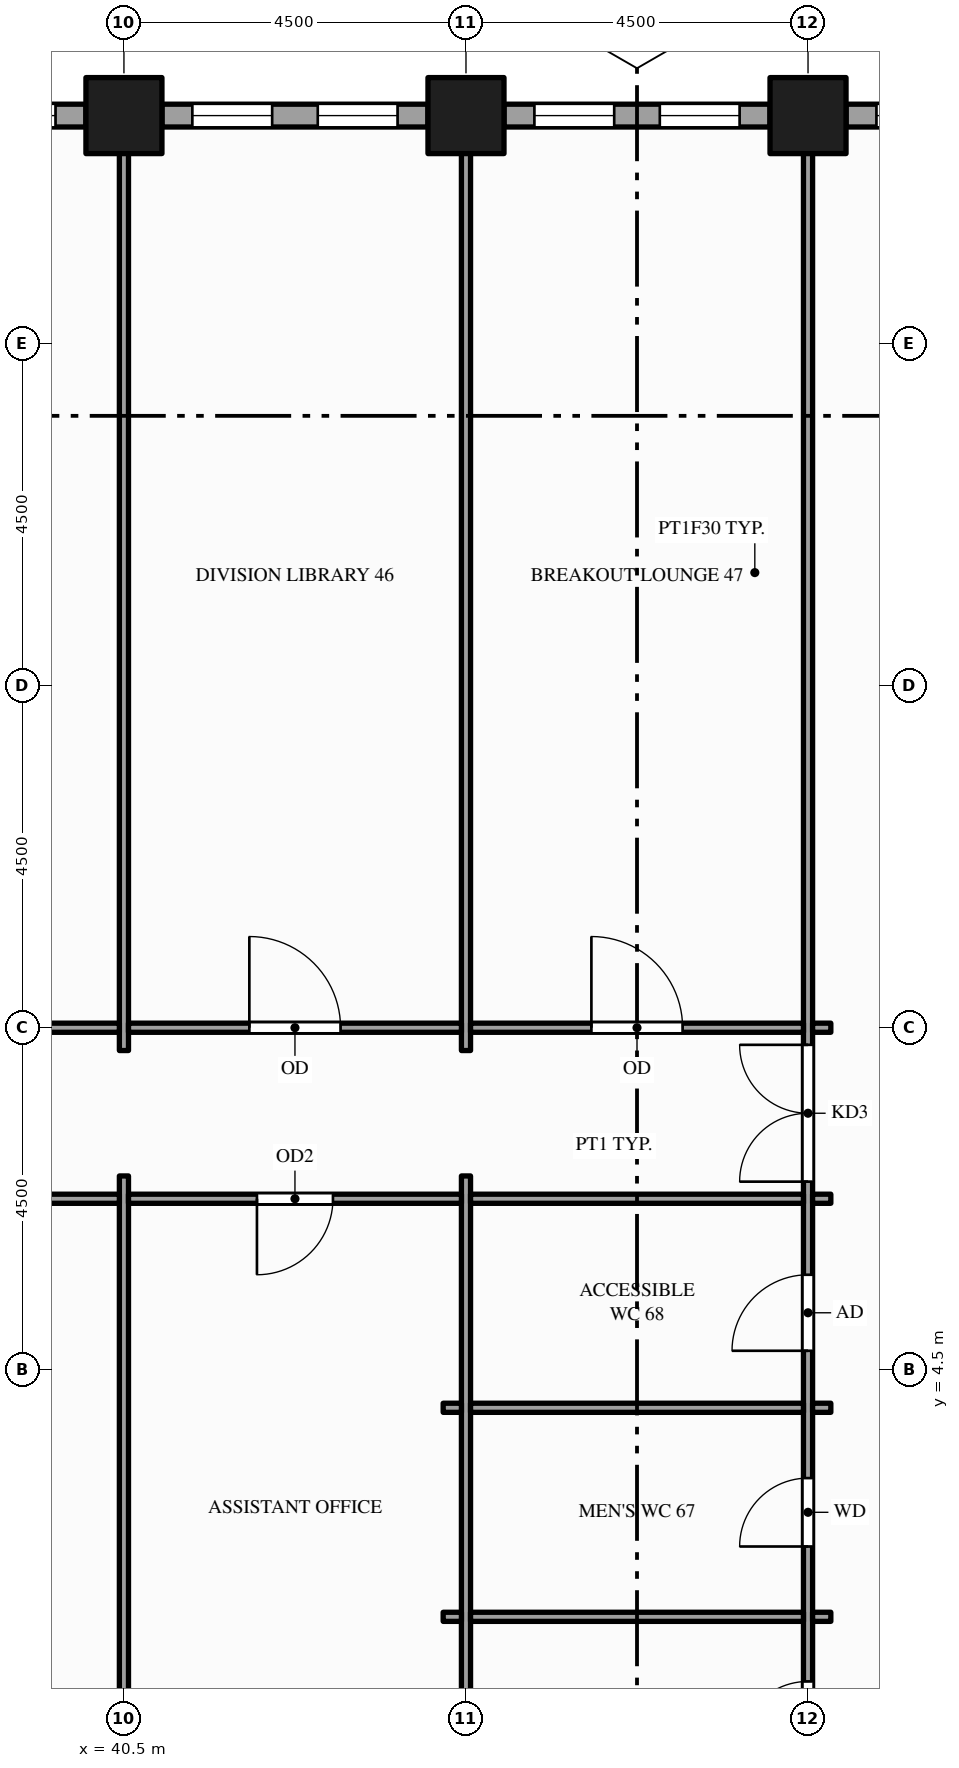
"""IFC4 building model, lengths in metres.
Left out: names, types, materials, properties, quantities, classifications, styles, units other than length and angle.
Written with IfcOpenShell. Run it as: python <this file> out.ifc"""

import sys

from ifc_helpers import new_model, si_unit, direction, frame, frame_2d, origin, origin_2d, place, context, subcontext, project, spatial, rectangle, hollow_rectangle, extrude, element, fill, save


model = new_model("IFC4")
c1 = context("Model", 3, precision=1e-05, world=origin(), true_north=direction((0.0, 1.0)))
c2 = subcontext(c1, "Body", "Model", "MODEL_VIEW")
j1 = project(units=[si_unit("LENGTHUNIT", "METRE"), si_unit("PLANEANGLEUNIT", "RADIAN")], contexts=[c1])
p1 = place(None, origin())
s1 = spatial("IfcSite", under=j1, at=p1, CompositionType="ELEMENT")
p2 = place(p1, origin())
s2 = spatial("IfcBuilding", under=s1, at=p2, CompositionType="ELEMENT")
p3 = place(p2, frame((0.0, 0.0, 103.0)))
s3 = spatial("IfcBuildingStorey", under=s2, at=p3, CompositionType="ELEMENT", Elevation=103.0)
for number, where, z_axis, x_axis in (
    (1, (40.5, 21.0, -0.15), (0.0, 0.0, 1.0), (1.0, 0.0, 0.0)),
    (2, (45.0, 21.0, -0.15), (0.0, 0.0, 1.0), (1.0, 0.0, 0.0)),
    (3, (49.5, 21.0, -0.15), (0.0, 0.0, 1.0), (1.0, 0.0, 0.0)),
):
    element("IfcColumn", number, at=place(p3, frame(where, z_axis=z_axis, x_axis=x_axis)), inside=s3, PredefinedType="COLUMN", context=c2, shape_type="SweptSolid", body=[
        extrude(hollow_rectangle(XDim=1.0, YDim=1.0, WallThickness=0.05, at=origin_2d()), origin(), (0.0, 0.0, 1.0), 4.0),
    ])
p4 = place(p3, frame((54.0, 21.0, 0.0), z_axis=(0.0, 0.0, 1.0), x_axis=(-1.0, 0.0, 0.0)))
e4 = element("IfcWall", 4, at=p4, inside=s3, PredefinedType="STANDARD", context=c2, shape_type="SweptSolid", body=[
    extrude(rectangle(XDim=4.0, YDim=0.3, at=frame_2d((2.0, 0.0))), origin(), (0.0, 0.0, 1.0), 3.154),
])
p5 = place(p4, frame((0.4, 0.0, 0.9)))
e5 = element("IfcOpeningElement", 5, at=p5, cuts=e4, PredefinedType="OPENING", context=c2, shape_type="SweptSolid", body=[
    extrude(rectangle(XDim=1.55, YDim=2.0, at=frame_2d((0.775, 1.0))), frame((0.0, 0.16, 0.0), z_axis=(0.0, -1.0, 0.0), x_axis=(1.0, 0.0, 0.0)), (0.0, 0.0, 1.0), 0.32),
])
p6 = place(p4, frame((2.55, 0.0, 0.9)))
e6 = element("IfcOpeningElement", 6, at=p6, cuts=e4, PredefinedType="OPENING", context=c2, shape_type="SweptSolid", body=[
    extrude(rectangle(XDim=1.05, YDim=2.0, at=frame_2d((0.525, 1.0))), frame((0.0, 0.16, 0.0), z_axis=(0.0, -1.0, 0.0), x_axis=(1.0, 0.0, 0.0)), (0.0, 0.0, 1.0), 0.32),
])
p7 = place(p3, frame((49.0, 21.0, 0.0), z_axis=(0.0, 0.0, 1.0), x_axis=(-1.0, 0.0, 0.0)))
e7 = element("IfcWall", 7, at=p7, inside=s3, PredefinedType="STANDARD", context=c2, shape_type="SweptSolid", body=[
    extrude(rectangle(XDim=3.5, YDim=0.3, at=frame_2d((1.75, 0.0))), origin(), (0.0, 0.0, 1.0), 3.154),
])
p8 = place(p7, frame((0.4, 0.0, 0.9)))
e8 = element("IfcOpeningElement", 8, at=p8, cuts=e7, PredefinedType="OPENING", context=c2, shape_type="SweptSolid", body=[
    extrude(rectangle(XDim=1.05, YDim=2.0, at=frame_2d((0.525, 1.0))), frame((0.0, 0.16, 0.0), z_axis=(0.0, -1.0, 0.0), x_axis=(1.0, 0.0, 0.0)), (0.0, 0.0, 1.0), 0.32),
])
p9 = place(p7, frame((2.05, 0.0, 0.9)))
e9 = element("IfcOpeningElement", 9, at=p9, cuts=e7, PredefinedType="OPENING", context=c2, shape_type="SweptSolid", body=[
    extrude(rectangle(XDim=1.05, YDim=2.0, at=frame_2d((0.525, 1.0))), frame((0.0, 0.16, 0.0), z_axis=(0.0, -1.0, 0.0), x_axis=(1.0, 0.0, 0.0)), (0.0, 0.0, 1.0), 0.32),
])
p10 = place(p3, frame((44.5, 21.0, 0.0), z_axis=(0.0, 0.0, 1.0), x_axis=(-1.0, 0.0, 0.0)))
e10 = element("IfcWall", 10, at=p10, inside=s3, PredefinedType="STANDARD", context=c2, shape_type="SweptSolid", body=[
    extrude(rectangle(XDim=3.5, YDim=0.3, at=frame_2d((1.75, 0.0))), origin(), (0.0, 0.0, 1.0), 3.154),
])
p11 = place(p10, frame((0.4, 0.0, 0.9)))
e11 = element("IfcOpeningElement", 11, at=p11, cuts=e10, PredefinedType="OPENING", context=c2, shape_type="SweptSolid", body=[
    extrude(rectangle(XDim=1.05, YDim=2.0, at=frame_2d((0.525, 1.0))), frame((0.0, 0.16, 0.0), z_axis=(0.0, -1.0, 0.0), x_axis=(1.0, 0.0, 0.0)), (0.0, 0.0, 1.0), 0.32),
])
p12 = place(p10, frame((2.05, 0.0, 0.9)))
e12 = element("IfcOpeningElement", 12, at=p12, cuts=e10, PredefinedType="OPENING", context=c2, shape_type="SweptSolid", body=[
    extrude(rectangle(XDim=1.05, YDim=2.0, at=frame_2d((0.525, 1.0))), frame((0.0, 0.16, 0.0), z_axis=(0.0, -1.0, 0.0), x_axis=(1.0, 0.0, 0.0)), (0.0, 0.0, 1.0), 0.32),
])
p13 = place(p3, frame((40.0, 21.0, 0.0), z_axis=(0.0, 0.0, 1.0), x_axis=(-1.0, 0.0, 0.0)))
e13 = element("IfcWall", 13, at=p13, inside=s3, PredefinedType="STANDARD", context=c2, shape_type="SweptSolid", body=[
    extrude(rectangle(XDim=3.5, YDim=0.3, at=frame_2d((1.75, 0.0))), origin(), (0.0, 0.0, 1.0), 3.154),
])
p14 = place(p13, frame((0.4, 0.0, 0.9)))
e14 = element("IfcOpeningElement", 14, at=p14, cuts=e13, PredefinedType="OPENING", context=c2, shape_type="SweptSolid", body=[
    extrude(rectangle(XDim=1.05, YDim=2.0, at=frame_2d((0.525, 1.0))), frame((0.0, 0.16, 0.0), z_axis=(0.0, -1.0, 0.0), x_axis=(1.0, 0.0, 0.0)), (0.0, 0.0, 1.0), 0.32),
])
p15 = place(p13, frame((2.05, 0.0, 0.9)))
e15 = element("IfcOpeningElement", 15, at=p15, cuts=e13, PredefinedType="OPENING", context=c2, shape_type="SweptSolid", body=[
    extrude(rectangle(XDim=1.05, YDim=2.0, at=frame_2d((0.525, 1.0))), frame((0.0, 0.16, 0.0), z_axis=(0.0, -1.0, 0.0), x_axis=(1.0, 0.0, 0.0)), (0.0, 0.0, 1.0), 0.32),
])
p16 = place(p3, frame((40.5, -1.35, 0.0), z_axis=(0.0, 0.0, 1.0), x_axis=(0.0, 1.0, 0.0)))
e16 = element("IfcWall", 16, at=p16, inside=s3, PredefinedType="PARTITIONING", context=c2, shape_type="SweptSolid", body=[
    extrude(rectangle(XDim=8.4, YDim=0.12, at=frame_2d((4.2, 0.0))), origin(), (0.0, 0.0, 1.0), 2.938),
])
p17 = place(p3, frame((40.5, 8.7, 0.0), z_axis=(0.0, 0.0, 1.0), x_axis=(0.0, 1.0, 0.0)))
e17 = element("IfcWall", 17, at=p17, inside=s3, PredefinedType="PARTITIONING", context=c2, shape_type="SweptSolid", body=[
    extrude(rectangle(XDim=12.15, YDim=0.12, at=frame_2d((6.075, 0.0))), origin(), (0.0, 0.0, 1.0), 2.938),
])
p18 = place(p3, frame((45.0, -1.35, 0.0), z_axis=(0.0, 0.0, 1.0), x_axis=(0.0, 1.0, 0.0)))
e18 = element("IfcWall", 18, at=p18, inside=s3, PredefinedType="PARTITIONING", context=c2, shape_type="SweptSolid", body=[
    extrude(rectangle(XDim=8.4, YDim=0.12, at=frame_2d((4.2, 0.0))), origin(), (0.0, 0.0, 1.0), 2.938),
])
p19 = place(p3, frame((45.0, 8.7, 0.0), z_axis=(0.0, 0.0, 1.0), x_axis=(0.0, 1.0, 0.0)))
e19 = element("IfcWall", 19, at=p19, inside=s3, PredefinedType="PARTITIONING", context=c2, shape_type="SweptSolid", body=[
    extrude(rectangle(XDim=12.15, YDim=0.12, at=frame_2d((6.075, 0.0))), origin(), (0.0, 0.0, 1.0), 2.938),
])
p20 = place(p3, frame((49.5, -1.35, 0.0), z_axis=(0.0, 0.0, 1.0), x_axis=(0.0, 1.0, 0.0)))
e20 = element("IfcWall", 20, at=p20, inside=s3, PredefinedType="PARTITIONING", context=c2, shape_type="SweptSolid", body=[
    extrude(rectangle(XDim=22.2, YDim=0.12, at=frame_2d((11.1, 0.0))), origin(), (0.0, 0.0, 1.0), 2.938),
])
p21 = place(p20, frame((8.325, 0.0, 0.0)))
e21 = element("IfcOpeningElement", 21, at=p21, cuts=e20, PredefinedType="OPENING", context=c2, shape_type="SweptSolid", body=[
    extrude(rectangle(XDim=1.8, YDim=2.1, at=frame_2d((0.9, 1.05))), frame((0.0, 0.07, 0.0), z_axis=(0.0, -1.0, 0.0), x_axis=(1.0, 0.0, 0.0)), (0.0, 0.0, 1.0), 0.14),
])
p22 = place(p20, frame((0.85, 0.0, 0.0)))
e22 = element("IfcOpeningElement", 22, at=p22, cuts=e20, PredefinedType="OPENING", context=c2, shape_type="SweptSolid", body=[
    extrude(rectangle(XDim=0.9, YDim=2.1, at=frame_2d((0.45, 1.05))), frame((0.0, 0.07, 0.0), z_axis=(0.0, -1.0, 0.0), x_axis=(1.0, 0.0, 0.0)), (0.0, 0.0, 1.0), 0.14),
])
p23 = place(p20, frame((3.525, 0.0, 0.0)))
e23 = element("IfcOpeningElement", 23, at=p23, cuts=e20, PredefinedType="OPENING", context=c2, shape_type="SweptSolid", body=[
    extrude(rectangle(XDim=0.9, YDim=2.1, at=frame_2d((0.45, 1.05))), frame((0.0, 0.07, 0.0), z_axis=(0.0, -1.0, 0.0), x_axis=(1.0, 0.0, 0.0)), (0.0, 0.0, 1.0), 0.14),
])
p24 = place(p20, frame((6.1, 0.0, 0.0)))
e24 = element("IfcOpeningElement", 24, at=p24, cuts=e20, PredefinedType="OPENING", context=c2, shape_type="SweptSolid", body=[
    extrude(rectangle(XDim=1.0, YDim=2.1, at=frame_2d((0.5, 1.05))), frame((0.0, 0.07, 0.0), z_axis=(0.0, -1.0, 0.0), x_axis=(1.0, 0.0, 0.0)), (0.0, 0.0, 1.0), 0.14),
])
p25 = place(p3, frame((44.7, 1.25, 0.0), z_axis=(0.0, 0.0, 1.0), x_axis=(1.0, 0.0, 0.0)))
e25 = element("IfcWall", 25, at=p25, inside=s3, PredefinedType="PARTITIONING", context=c2, shape_type="SweptSolid", body=[
    extrude(rectangle(XDim=0.24, YDim=0.12, at=frame_2d((0.12, 0.0))), origin(), (0.0, 0.0, 1.0), 2.938),
])
p26 = place(p3, frame((45.06, 1.25, 0.0), z_axis=(0.0, 0.0, 1.0), x_axis=(1.0, 0.0, 0.0)))
e26 = element("IfcWall", 26, at=p26, inside=s3, PredefinedType="PARTITIONING", context=c2, shape_type="SweptSolid", body=[
    extrude(rectangle(XDim=4.38, YDim=0.12, at=frame_2d((2.19, 0.0))), origin(), (0.0, 0.0, 1.0), 2.938),
])
for number, where, z_axis, x_axis in (
    (27, (49.56, 1.25, 0.0), (0.0, 0.0, 1.0), (1.0, 0.0, 0.0)),
    (28, (44.7, 4.0, 0.0), (0.0, 0.0, 1.0), (1.0, 0.0, 0.0)),
):
    element("IfcWall", number, at=place(p3, frame(where, z_axis=z_axis, x_axis=x_axis)), inside=s3, PredefinedType="PARTITIONING", context=c2, shape_type="SweptSolid", body=[
        extrude(rectangle(XDim=0.24, YDim=0.12, at=frame_2d((0.12, 0.0))), origin(), (0.0, 0.0, 1.0), 2.938),
    ])
p27 = place(p3, frame((45.06, 4.0, 0.0), z_axis=(0.0, 0.0, 1.0), x_axis=(1.0, 0.0, 0.0)))
e29 = element("IfcWall", 29, at=p27, inside=s3, PredefinedType="PARTITIONING", context=c2, shape_type="SweptSolid", body=[
    extrude(rectangle(XDim=4.38, YDim=0.12, at=frame_2d((2.19, 0.0))), origin(), (0.0, 0.0, 1.0), 2.938),
])
p28 = place(p3, frame((49.56, 4.0, 0.0), z_axis=(0.0, 0.0, 1.0), x_axis=(1.0, 0.0, 0.0)))
e30 = element("IfcWall", 30, at=p28, inside=s3, PredefinedType="PARTITIONING", context=c2, shape_type="SweptSolid", body=[
    extrude(rectangle(XDim=0.24, YDim=0.12, at=frame_2d((0.12, 0.0))), origin(), (0.0, 0.0, 1.0), 2.938),
])
p29 = place(p3, frame((36.06, 6.75, 0.0), z_axis=(0.0, 0.0, 1.0), x_axis=(1.0, 0.0, 0.0)))
e31 = element("IfcWall", 31, at=p29, inside=s3, PredefinedType="PARTITIONING", context=c2, shape_type="SweptSolid", body=[
    extrude(rectangle(XDim=4.38, YDim=0.12, at=frame_2d((2.19, 0.0))), origin(), (0.0, 0.0, 1.0), 2.938),
])
p30 = place(p29, frame((1.59, 0.0, 0.0)))
e32 = element("IfcOpeningElement", 32, at=p30, cuts=e31, PredefinedType="OPENING", context=c2, shape_type="SweptSolid", body=[
    extrude(rectangle(XDim=1.2, YDim=2.1, at=frame_2d((0.6, 1.05))), frame((0.0, 0.07, 0.0), z_axis=(0.0, -1.0, 0.0), x_axis=(1.0, 0.0, 0.0)), (0.0, 0.0, 1.0), 0.14),
])
p31 = place(p3, frame((40.56, 6.75, 0.0), z_axis=(0.0, 0.0, 1.0), x_axis=(1.0, 0.0, 0.0)))
e33 = element("IfcWall", 33, at=p31, inside=s3, PredefinedType="PARTITIONING", context=c2, shape_type="SweptSolid", body=[
    extrude(rectangle(XDim=4.38, YDim=0.12, at=frame_2d((2.19, 0.0))), origin(), (0.0, 0.0, 1.0), 2.938),
])
p32 = place(p31, frame((1.69, 0.0, 0.0)))
e34 = element("IfcOpeningElement", 34, at=p32, cuts=e33, PredefinedType="OPENING", context=c2, shape_type="SweptSolid", body=[
    extrude(rectangle(XDim=1.0, YDim=2.1, at=frame_2d((0.5, 1.05))), frame((0.0, 0.07, 0.0), z_axis=(0.0, -1.0, 0.0), x_axis=(1.0, 0.0, 0.0)), (0.0, 0.0, 1.0), 0.14),
])
p33 = place(p3, frame((45.06, 6.75, 0.0), z_axis=(0.0, 0.0, 1.0), x_axis=(1.0, 0.0, 0.0)))
e35 = element("IfcWall", 35, at=p33, inside=s3, PredefinedType="PARTITIONING", context=c2, shape_type="SweptSolid", body=[
    extrude(rectangle(XDim=4.38, YDim=0.12, at=frame_2d((2.19, 0.0))), origin(), (0.0, 0.0, 1.0), 2.938),
])
p34 = place(p3, frame((49.56, 6.75, 0.0), z_axis=(0.0, 0.0, 1.0), x_axis=(1.0, 0.0, 0.0)))
e36 = element("IfcWall", 36, at=p34, inside=s3, PredefinedType="PARTITIONING", context=c2, shape_type="SweptSolid", body=[
    extrude(rectangle(XDim=0.24, YDim=0.12, at=frame_2d((0.12, 0.0))), origin(), (0.0, 0.0, 1.0), 2.938),
])
p35 = place(p3, frame((31.56, 9.0, 0.0), z_axis=(0.0, 0.0, 1.0), x_axis=(1.0, 0.0, 0.0)))
e37 = element("IfcWall", 37, at=p35, inside=s3, PredefinedType="PARTITIONING", context=c2, shape_type="SweptSolid", body=[
    extrude(rectangle(XDim=8.88, YDim=0.12, at=frame_2d((4.44, 0.0))), origin(), (0.0, 0.0, 1.0), 2.938),
])
p36 = place(p35, frame((3.54, 0.0, 0.0)))
e38 = element("IfcOpeningElement", 38, at=p36, cuts=e37, PredefinedType="OPENING", context=c2, shape_type="SweptSolid", body=[
    extrude(rectangle(XDim=1.8, YDim=2.1, at=frame_2d((0.9, 1.05))), frame((0.0, 0.07, 0.0), z_axis=(0.0, -1.0, 0.0), x_axis=(1.0, 0.0, 0.0)), (0.0, 0.0, 1.0), 0.14),
])
p37 = place(p3, frame((40.56, 9.0, 0.0), z_axis=(0.0, 0.0, 1.0), x_axis=(1.0, 0.0, 0.0)))
e39 = element("IfcWall", 39, at=p37, inside=s3, PredefinedType="PARTITIONING", context=c2, shape_type="SweptSolid", body=[
    extrude(rectangle(XDim=4.38, YDim=0.12, at=frame_2d((2.19, 0.0))), origin(), (0.0, 0.0, 1.0), 2.938),
])
p38 = place(p37, frame((1.59, 0.0, 0.0)))
e40 = element("IfcOpeningElement", 40, at=p38, cuts=e39, PredefinedType="OPENING", context=c2, shape_type="SweptSolid", body=[
    extrude(rectangle(XDim=1.2, YDim=2.1, at=frame_2d((0.6, 1.05))), frame((0.0, 0.07, 0.0), z_axis=(0.0, -1.0, 0.0), x_axis=(1.0, 0.0, 0.0)), (0.0, 0.0, 1.0), 0.14),
])
p39 = place(p3, frame((45.06, 9.0, 0.0), z_axis=(0.0, 0.0, 1.0), x_axis=(1.0, 0.0, 0.0)))
e41 = element("IfcWall", 41, at=p39, inside=s3, PredefinedType="PARTITIONING", context=c2, shape_type="SweptSolid", body=[
    extrude(rectangle(XDim=4.38, YDim=0.12, at=frame_2d((2.19, 0.0))), origin(), (0.0, 0.0, 1.0), 2.938),
])
p40 = place(p39, frame((1.59, 0.0, 0.0)))
e42 = element("IfcOpeningElement", 42, at=p40, cuts=e41, PredefinedType="OPENING", context=c2, shape_type="SweptSolid", body=[
    extrude(rectangle(XDim=1.2, YDim=2.1, at=frame_2d((0.6, 1.05))), frame((0.0, 0.07, 0.0), z_axis=(0.0, -1.0, 0.0), x_axis=(1.0, 0.0, 0.0)), (0.0, 0.0, 1.0), 0.14),
])
p41 = place(p3, frame((49.56, 9.0, 0.0), z_axis=(0.0, 0.0, 1.0), x_axis=(1.0, 0.0, 0.0)))
e43 = element("IfcWall", 43, at=p41, inside=s3, PredefinedType="PARTITIONING", context=c2, shape_type="SweptSolid", body=[
    extrude(rectangle(XDim=0.24, YDim=0.12, at=frame_2d((0.12, 0.0))), origin(), (0.0, 0.0, 1.0), 2.938),
])
p42 = place(p6, origin())
e44 = element("IfcWindow", 44, at=p42, inside=s3, PartitioningType="SINGLE_PANEL", PredefinedType="WINDOW", context=c2, shape_type="SweptSolid", body=[
    extrude(rectangle(XDim=1.05, YDim=2.0, at=frame_2d((0.525, 1.0))), frame((0.0, 0.03, 0.0), z_axis=(0.0, -1.0, 0.0), x_axis=(1.0, 0.0, 0.0)), (0.0, 0.0, 1.0), 0.06),
])
fill(e6, e44)
p43 = place(p8, origin())
e45 = element("IfcWindow", 45, at=p43, inside=s3, PartitioningType="SINGLE_PANEL", PredefinedType="WINDOW", context=c2, shape_type="SweptSolid", body=[
    extrude(rectangle(XDim=1.05, YDim=2.0, at=frame_2d((0.525, 1.0))), frame((0.0, 0.03, 0.0), z_axis=(0.0, -1.0, 0.0), x_axis=(1.0, 0.0, 0.0)), (0.0, 0.0, 1.0), 0.06),
])
fill(e8, e45)
p44 = place(p9, origin())
e46 = element("IfcWindow", 46, at=p44, inside=s3, PartitioningType="SINGLE_PANEL", PredefinedType="WINDOW", context=c2, shape_type="SweptSolid", body=[
    extrude(rectangle(XDim=1.05, YDim=2.0, at=frame_2d((0.525, 1.0))), frame((0.0, 0.03, 0.0), z_axis=(0.0, -1.0, 0.0), x_axis=(1.0, 0.0, 0.0)), (0.0, 0.0, 1.0), 0.06),
])
fill(e9, e46)
p45 = place(p11, origin())
e47 = element("IfcWindow", 47, at=p45, inside=s3, PartitioningType="SINGLE_PANEL", PredefinedType="WINDOW", context=c2, shape_type="SweptSolid", body=[
    extrude(rectangle(XDim=1.05, YDim=2.0, at=frame_2d((0.525, 1.0))), frame((0.0, 0.03, 0.0), z_axis=(0.0, -1.0, 0.0), x_axis=(1.0, 0.0, 0.0)), (0.0, 0.0, 1.0), 0.06),
])
fill(e11, e47)
p46 = place(p12, origin())
e48 = element("IfcWindow", 48, at=p46, inside=s3, PartitioningType="SINGLE_PANEL", PredefinedType="WINDOW", context=c2, shape_type="SweptSolid", body=[
    extrude(rectangle(XDim=1.05, YDim=2.0, at=frame_2d((0.525, 1.0))), frame((0.0, 0.03, 0.0), z_axis=(0.0, -1.0, 0.0), x_axis=(1.0, 0.0, 0.0)), (0.0, 0.0, 1.0), 0.06),
])
fill(e12, e48)
p47 = place(p14, origin())
e49 = element("IfcWindow", 49, at=p47, inside=s3, PartitioningType="SINGLE_PANEL", PredefinedType="WINDOW", context=c2, shape_type="SweptSolid", body=[
    extrude(rectangle(XDim=1.05, YDim=2.0, at=frame_2d((0.525, 1.0))), frame((0.0, 0.03, 0.0), z_axis=(0.0, -1.0, 0.0), x_axis=(1.0, 0.0, 0.0)), (0.0, 0.0, 1.0), 0.06),
])
fill(e14, e49)
p48 = place(p21, origin())
e50 = element("IfcDoor", 50, at=p48, inside=s3, OperationType="DOUBLE_DOOR_SINGLE_SWING", PredefinedType="DOOR", context=c2, shape_type="SweptSolid", body=[
    extrude(rectangle(XDim=1.8, YDim=2.1, at=frame_2d((0.9, 1.05))), frame((0.0, 0.025, 0.0), z_axis=(0.0, -1.0, 0.0), x_axis=(1.0, 0.0, 0.0)), (0.0, 0.0, 1.0), 0.05),
])
fill(e21, e50)
p49 = place(p32, origin())
e51 = element("IfcDoor", 51, at=p49, inside=s3, OperationType="SINGLE_SWING_LEFT", PredefinedType="DOOR", context=c2, shape_type="SweptSolid", body=[
    extrude(rectangle(XDim=1.0, YDim=2.1, at=frame_2d((0.5, 1.05))), frame((0.0, 0.025, 0.0), z_axis=(0.0, -1.0, 0.0), x_axis=(1.0, 0.0, 0.0)), (0.0, 0.0, 1.0), 0.05),
])
fill(e34, e51)
p50 = place(p22, origin())
e52 = element("IfcDoor", 52, at=p50, inside=s3, OperationType="SINGLE_SWING_LEFT", PredefinedType="DOOR", context=c2, shape_type="SweptSolid", body=[
    extrude(rectangle(XDim=0.9, YDim=2.1, at=frame_2d((0.45, 1.05))), frame((0.0, 0.025, 0.0), z_axis=(0.0, -1.0, 0.0), x_axis=(1.0, 0.0, 0.0)), (0.0, 0.0, 1.0), 0.05),
])
fill(e22, e52)
p51 = place(p23, origin())
e53 = element("IfcDoor", 53, at=p51, inside=s3, OperationType="SINGLE_SWING_LEFT", PredefinedType="DOOR", context=c2, shape_type="SweptSolid", body=[
    extrude(rectangle(XDim=0.9, YDim=2.1, at=frame_2d((0.45, 1.05))), frame((0.0, 0.025, 0.0), z_axis=(0.0, -1.0, 0.0), x_axis=(1.0, 0.0, 0.0)), (0.0, 0.0, 1.0), 0.05),
])
fill(e23, e53)
p52 = place(p24, origin())
e54 = element("IfcDoor", 54, at=p52, inside=s3, OperationType="SINGLE_SWING_LEFT", PredefinedType="DOOR", context=c2, shape_type="SweptSolid", body=[
    extrude(rectangle(XDim=1.0, YDim=2.1, at=frame_2d((0.5, 1.05))), frame((0.0, 0.025, 0.0), z_axis=(0.0, -1.0, 0.0), x_axis=(1.0, 0.0, 0.0)), (0.0, 0.0, 1.0), 0.05),
])
fill(e24, e54)
p53 = place(p38, origin())
e55 = element("IfcDoor", 55, at=p53, inside=s3, OperationType="SINGLE_SWING_LEFT", PredefinedType="DOOR", context=c2, shape_type="SweptSolid", body=[
    extrude(rectangle(XDim=1.2, YDim=2.1, at=frame_2d((0.6, 1.05))), frame((0.0, 0.025, 0.0), z_axis=(0.0, -1.0, 0.0), x_axis=(1.0, 0.0, 0.0)), (0.0, 0.0, 1.0), 0.05),
])
fill(e40, e55)
p54 = place(p40, origin())
e56 = element("IfcDoor", 56, at=p54, inside=s3, OperationType="SINGLE_SWING_LEFT", PredefinedType="DOOR", context=c2, shape_type="SweptSolid", body=[
    extrude(rectangle(XDim=1.2, YDim=2.1, at=frame_2d((0.6, 1.05))), frame((0.0, 0.025, 0.0), z_axis=(0.0, -1.0, 0.0), x_axis=(1.0, 0.0, 0.0)), (0.0, 0.0, 1.0), 0.05),
])
fill(e42, e56)
save(model, sys.argv[1])
